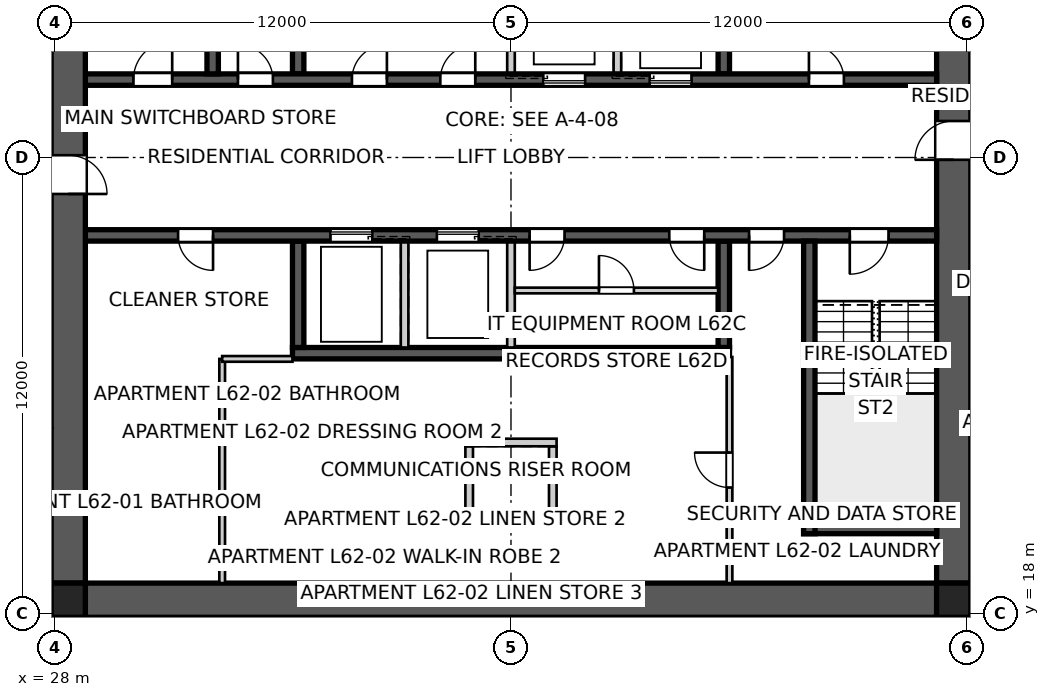
"""IFC4 building model, lengths in metres.
Left out: names, types, materials, properties, quantities, classifications, styles, units other than length and angle.
Written with IfcOpenShell. Run it as: python <this file> out.ifc"""

import sys

from ifc_helpers import new_model, si_unit, direction, frame, frame_2d, origin, origin_2d, place, context, subcontext, project, spatial, polyline, rectangle, outline, extrude, element, fill, save


model = new_model("IFC4")
c1 = context("Model", 3, precision=1e-05, world=origin(), true_north=direction((0.0, 1.0)))
c2 = subcontext(c1, "Body", "Model", "MODEL_VIEW")
j1 = project(units=[si_unit("LENGTHUNIT", "METRE"), si_unit("PLANEANGLEUNIT", "RADIAN")], contexts=[c1])
p1 = place(None, origin())
s1 = spatial("IfcSite", under=j1, at=p1, CompositionType="ELEMENT")
p2 = place(p1, origin())
s2 = spatial("IfcBuilding", under=s1, at=p2, CompositionType="ELEMENT")
p3 = place(p2, frame((0.0, 0.0, 225.2)))
s3 = spatial("IfcBuildingStorey", under=s2, at=p3, CompositionType="ELEMENT", Elevation=225.2)
p4 = place(p3, frame((51.2, 18.35, 0.0), z_axis=(0.0, 0.0, 1.0), x_axis=(-1.0, 0.0, 0.0)))
e1 = element("IfcWall", 1, at=p4, inside=s3, PredefinedType="SHEAR", context=c2, shape_type="SweptSolid", body=[
    extrude(outline(polyline([(0.0, -0.45), (22.4, -0.45), (22.4, -0.025), (22.85, -0.025), (22.85, 0.025), (22.4, 0.025), (22.4, 0.45), (0.0, 0.45), (0.0, 0.025), (-0.45, 0.025), (-0.45, -0.025), (0.0, -0.025), (0.0, -0.45)])), origin(), (0.0, 0.0, 1.0), 3.4),
])
p5 = place(p3, frame((51.65, 18.8, 0.0), z_axis=(0.0, 0.0, 1.0), x_axis=(0.0, 1.0, 0.0)))
e2 = element("IfcWall", 2, at=p5, inside=s3, PredefinedType="SHEAR", context=c2, shape_type="SweptSolid", body=[
    extrude(outline(polyline([(0.0, -0.45), (22.4, -0.45), (22.4, -0.025), (22.85, -0.025), (22.85, 0.025), (22.4, 0.025), (22.4, 0.45), (0.0, 0.45), (0.0, 0.025), (-0.45, 0.025), (-0.45, -0.025), (0.0, -0.025), (0.0, -0.45)])), origin(), (0.0, 0.0, 1.0), 3.4),
])
p6 = place(p5, frame((11.14, 0.0, 0.0)))
e3 = element("IfcOpeningElement", 3, at=p6, cuts=e2, PredefinedType="OPENING", context=c2, shape_type="SweptSolid", body=[
    extrude(rectangle(XDim=1.02, YDim=2.4, at=frame_2d((0.51, 1.2))), frame((0.0, 0.46, 0.0), z_axis=(0.0, -1.0, 0.0), x_axis=(1.0, 0.0, 0.0)), (0.0, 0.0, 1.0), 0.92),
])
p7 = place(p3, frame((28.35, 41.2, 0.0), z_axis=(0.0, 0.0, 1.0), x_axis=(0.0, -1.0, 0.0)))
e4 = element("IfcWall", 4, at=p7, inside=s3, PredefinedType="SHEAR", context=c2, shape_type="SweptSolid", body=[
    extrude(outline(polyline([(0.0, -0.45), (22.4, -0.45), (22.4, -0.025), (22.85, -0.025), (22.85, 0.025), (22.4, 0.025), (22.4, 0.45), (0.0, 0.45), (0.0, 0.025), (-0.45, 0.025), (-0.45, -0.025), (0.0, -0.025), (0.0, -0.45)])), origin(), (0.0, 0.0, 1.0), 3.4),
])
p8 = place(p7, frame((11.14, 0.0, 0.0)))
e5 = element("IfcOpeningElement", 5, at=p8, cuts=e4, PredefinedType="OPENING", context=c2, shape_type="SweptSolid", body=[
    extrude(rectangle(XDim=1.02, YDim=2.4, at=frame_2d((0.51, 1.2))), frame((0.0, 0.46, 0.0), z_axis=(0.0, -1.0, 0.0), x_axis=(1.0, 0.0, 0.0)), (0.0, 0.0, 1.0), 0.92),
])
p9 = place(p3, frame((28.8, 32.05, 0.0), z_axis=(0.0, 0.0, 1.0), x_axis=(1.0, 0.0, 0.0)))
e6 = element("IfcWall", 6, at=p9, inside=s3, PredefinedType="SHEAR", context=c2, shape_type="SweptSolid", body=[
    extrude(rectangle(XDim=22.4, YDim=0.3, at=frame_2d((11.2, 0.0))), origin(), (0.0, 0.0, 1.0), 3.4),
])
p10 = place(p9, frame((19.04, 0.0, 0.0)))
e7 = element("IfcOpeningElement", 7, at=p10, cuts=e6, PredefinedType="OPENING", context=c2, shape_type="SweptSolid", body=[
    extrude(rectangle(XDim=0.92, YDim=2.1, at=frame_2d((0.46, 1.05))), frame((0.0, 0.16, 0.0), z_axis=(0.0, -1.0, 0.0), x_axis=(1.0, 0.0, 0.0)), (0.0, 0.0, 1.0), 0.32),
])
p11 = place(p9, frame((1.265, 0.0, 0.0)))
e8 = element("IfcOpeningElement", 8, at=p11, cuts=e6, PredefinedType="OPENING", context=c2, shape_type="SweptSolid", body=[
    extrude(rectangle(XDim=1.02, YDim=2.1, at=frame_2d((0.51, 1.05))), frame((0.0, 0.16, 0.0), z_axis=(0.0, -1.0, 0.0), x_axis=(1.0, 0.0, 0.0)), (0.0, 0.0, 1.0), 0.32),
])
p12 = place(p9, frame((4.015, 0.0, 0.0)))
e9 = element("IfcOpeningElement", 9, at=p12, cuts=e6, PredefinedType="OPENING", context=c2, shape_type="SweptSolid", body=[
    extrude(rectangle(XDim=0.92, YDim=2.1, at=frame_2d((0.46, 1.05))), frame((0.0, 0.16, 0.0), z_axis=(0.0, -1.0, 0.0), x_axis=(1.0, 0.0, 0.0)), (0.0, 0.0, 1.0), 0.32),
])
p13 = place(p9, frame((7.015, 0.0, 0.0)))
e10 = element("IfcOpeningElement", 10, at=p13, cuts=e6, PredefinedType="OPENING", context=c2, shape_type="SweptSolid", body=[
    extrude(rectangle(XDim=0.92, YDim=2.1, at=frame_2d((0.46, 1.05))), frame((0.0, 0.16, 0.0), z_axis=(0.0, -1.0, 0.0), x_axis=(1.0, 0.0, 0.0)), (0.0, 0.0, 1.0), 0.32),
])
p14 = place(p9, frame((9.34, 0.0, 0.0)))
e11 = element("IfcOpeningElement", 11, at=p14, cuts=e6, PredefinedType="OPENING", context=c2, shape_type="SweptSolid", body=[
    extrude(rectangle(XDim=0.92, YDim=2.1, at=frame_2d((0.46, 1.05))), frame((0.0, 0.16, 0.0), z_axis=(0.0, -1.0, 0.0), x_axis=(1.0, 0.0, 0.0)), (0.0, 0.0, 1.0), 0.32),
])
p15 = place(p9, frame((12.05, 0.0, 0.0)))
e12 = element("IfcOpeningElement", 12, at=p15, cuts=e6, PredefinedType="OPENING", context=c2, shape_type="SweptSolid", body=[
    extrude(rectangle(XDim=1.1, YDim=2.1, at=frame_2d((0.55, 1.05))), frame((0.0, 0.16, 0.0), z_axis=(0.0, -1.0, 0.0), x_axis=(1.0, 0.0, 0.0)), (0.0, 0.0, 1.0), 0.32),
])
p16 = place(p9, frame((14.85, 0.0, 0.0)))
e13 = element("IfcOpeningElement", 13, at=p16, cuts=e6, PredefinedType="OPENING", context=c2, shape_type="SweptSolid", body=[
    extrude(rectangle(XDim=1.1, YDim=2.1, at=frame_2d((0.55, 1.05))), frame((0.0, 0.16, 0.0), z_axis=(0.0, -1.0, 0.0), x_axis=(1.0, 0.0, 0.0)), (0.0, 0.0, 1.0), 0.32),
])
p17 = place(p3, frame((51.2, 27.95, 0.0), z_axis=(0.0, 0.0, 1.0), x_axis=(-1.0, 0.0, 0.0)))
e14 = element("IfcWall", 14, at=p17, inside=s3, PredefinedType="SHEAR", context=c2, shape_type="SweptSolid", body=[
    extrude(rectangle(XDim=22.4, YDim=0.3, at=frame_2d((11.2, 0.0))), origin(), (0.0, 0.0, 1.0), 3.4),
])
p18 = place(p17, frame((19.04, 0.0, 0.0)))
e15 = element("IfcOpeningElement", 15, at=p18, cuts=e14, PredefinedType="OPENING", context=c2, shape_type="SweptSolid", body=[
    extrude(rectangle(XDim=0.92, YDim=2.1, at=frame_2d((0.46, 1.05))), frame((0.0, 0.16, 0.0), z_axis=(0.0, -1.0, 0.0), x_axis=(1.0, 0.0, 0.0)), (0.0, 0.0, 1.0), 0.32),
])
p19 = place(p17, frame((1.265, 0.0, 0.0)))
e16 = element("IfcOpeningElement", 16, at=p19, cuts=e14, PredefinedType="OPENING", context=c2, shape_type="SweptSolid", body=[
    extrude(rectangle(XDim=1.02, YDim=2.1, at=frame_2d((0.51, 1.05))), frame((0.0, 0.16, 0.0), z_axis=(0.0, -1.0, 0.0), x_axis=(1.0, 0.0, 0.0)), (0.0, 0.0, 1.0), 0.32),
])
p20 = place(p17, frame((4.015, 0.0, 0.0)))
e17 = element("IfcOpeningElement", 17, at=p20, cuts=e14, PredefinedType="OPENING", context=c2, shape_type="SweptSolid", body=[
    extrude(rectangle(XDim=0.92, YDim=2.1, at=frame_2d((0.46, 1.05))), frame((0.0, 0.16, 0.0), z_axis=(0.0, -1.0, 0.0), x_axis=(1.0, 0.0, 0.0)), (0.0, 0.0, 1.0), 0.32),
])
p21 = place(p17, frame((9.79, 0.0, 0.0)))
e18 = element("IfcOpeningElement", 18, at=p21, cuts=e14, PredefinedType="OPENING", context=c2, shape_type="SweptSolid", body=[
    extrude(rectangle(XDim=0.92, YDim=2.1, at=frame_2d((0.46, 1.05))), frame((0.0, 0.16, 0.0), z_axis=(0.0, -1.0, 0.0), x_axis=(1.0, 0.0, 0.0)), (0.0, 0.0, 1.0), 0.32),
])
p22 = place(p17, frame((6.115, 0.0, 0.0)))
e19 = element("IfcOpeningElement", 19, at=p22, cuts=e14, PredefinedType="OPENING", context=c2, shape_type="SweptSolid", body=[
    extrude(rectangle(XDim=0.92, YDim=2.1, at=frame_2d((0.46, 1.05))), frame((0.0, 0.16, 0.0), z_axis=(0.0, -1.0, 0.0), x_axis=(1.0, 0.0, 0.0)), (0.0, 0.0, 1.0), 0.32),
])
p23 = place(p17, frame((12.05, 0.0, 0.0)))
e20 = element("IfcOpeningElement", 20, at=p23, cuts=e14, PredefinedType="OPENING", context=c2, shape_type="SweptSolid", body=[
    extrude(rectangle(XDim=1.1, YDim=2.1, at=frame_2d((0.55, 1.05))), frame((0.0, 0.16, 0.0), z_axis=(0.0, -1.0, 0.0), x_axis=(1.0, 0.0, 0.0)), (0.0, 0.0, 1.0), 0.32),
])
p24 = place(p17, frame((14.85, 0.0, 0.0)))
e21 = element("IfcOpeningElement", 21, at=p24, cuts=e14, PredefinedType="OPENING", context=c2, shape_type="SweptSolid", body=[
    extrude(rectangle(XDim=1.1, YDim=2.1, at=frame_2d((0.55, 1.05))), frame((0.0, 0.16, 0.0), z_axis=(0.0, -1.0, 0.0), x_axis=(1.0, 0.0, 0.0)), (0.0, 0.0, 1.0), 0.32),
])
p25 = place(p3, frame((45.75, 24.85, 0.0), z_axis=(0.0, 0.0, 1.0), x_axis=(-1.0, 0.0, 0.0)))
e22 = element("IfcWall", 22, at=p25, inside=s3, PredefinedType="SHEAR", context=c2, shape_type="SweptSolid", body=[
    extrude(rectangle(XDim=11.5, YDim=0.3, at=frame_2d((5.75, 0.0))), origin(), (0.0, 0.0, 1.0), 3.4),
])
for number, where, z_axis, x_axis in (
    (23, (34.4, 32.2, 0.0), (0.0, 0.0, 1.0), (0.0, 1.0, 0.0)),
    (24, (45.6, 27.8, 0.0), (0.0, 0.0, 1.0), (0.0, -1.0, 0.0)),
):
    element("IfcWall", number, at=place(p3, frame(where, z_axis=z_axis, x_axis=x_axis)), inside=s3, PredefinedType="SHEAR", context=c2, shape_type="SweptSolid", body=[
        extrude(rectangle(XDim=2.8, YDim=0.3, at=frame_2d((1.4, 0.0))), origin(), (0.0, 0.0, 1.0), 3.4),
    ])
for number, where, z_axis, x_axis in (
    (25, (40.0, 32.2, 0.0), (0.0, 0.0, 1.0), (0.0, 1.0, 0.0)),
    (26, (40.0, 27.8, 0.0), (0.0, 0.0, 1.0), (0.0, -1.0, 0.0)),
    (27, (42.8, 32.2, 0.0), (0.0, 0.0, 1.0), (0.0, 1.0, 0.0)),
    (28, (37.2, 27.8, 0.0), (0.0, 0.0, 1.0), (0.0, -1.0, 0.0)),
):
    element("IfcWall", number, at=place(p3, frame(where, z_axis=z_axis, x_axis=x_axis)), inside=s3, PredefinedType="SOLIDWALL", context=c2, shape_type="SweptSolid", body=[
        extrude(rectangle(XDim=2.8, YDim=0.2, at=frame_2d((1.4, 0.0))), origin(), (0.0, 0.0, 1.0), 3.4),
    ])
for number, where, z_axis, x_axis in (
    (29, (45.6, 32.2, 0.0), (0.0, 0.0, 1.0), (0.0, 1.0, 0.0)),
    (30, (34.4, 27.8, 0.0), (0.0, 0.0, 1.0), (0.0, -1.0, 0.0)),
):
    element("IfcWall", number, at=place(p3, frame(where, z_axis=z_axis, x_axis=x_axis)), inside=s3, PredefinedType="SHEAR", context=c2, shape_type="SweptSolid", body=[
        extrude(rectangle(XDim=2.8, YDim=0.3, at=frame_2d((1.4, 0.0))), origin(), (0.0, 0.0, 1.0), 3.4),
    ])
for number, where, z_axis, x_axis in (
    (31, (32.15, 32.2, 0.0), (0.0, 0.0, 1.0), (0.0, 1.0, 0.0)),
    (32, (47.85, 27.8, 0.0), (0.0, 0.0, 1.0), (0.0, -1.0, 0.0)),
):
    element("IfcWall", number, at=place(p3, frame(where, z_axis=z_axis, x_axis=x_axis)), inside=s3, PredefinedType="SHEAR", context=c2, shape_type="SweptSolid", body=[
        extrude(rectangle(XDim=7.7, YDim=0.3, at=frame_2d((3.85, 0.0))), origin(), (0.0, 0.0, 1.0), 3.4),
    ])
p26 = place(p3, frame((51.2, 20.25, 0.0), z_axis=(0.0, 0.0, 1.0), x_axis=(-1.0, 0.0, 0.0)))
e33 = element("IfcWall", 33, at=p26, inside=s3, PredefinedType="SHEAR", context=c2, shape_type="SweptSolid", body=[
    extrude(rectangle(XDim=3.5, YDim=0.3, at=frame_2d((1.75, 0.0))), origin(), (0.0, 0.0, 1.0), 3.4),
])
for number, where, z_axis, x_axis in (
    (34, (38.9, 22.4, 0.0), (0.0, 0.0, 1.0), (0.0, -1.0, 0.0)),
    (35, (41.1, 22.4, 0.0), (0.0, 0.0, 1.0), (0.0, -1.0, 0.0)),
):
    element("IfcWall", number, at=place(p3, frame(where, z_axis=z_axis, x_axis=x_axis)), inside=s3, PredefinedType="SOLIDWALL", context=c2, shape_type="SweptSolid", body=[
        extrude(rectangle(XDim=2.0, YDim=0.2, at=frame_2d((1.0, 0.0))), origin(), (0.0, 0.0, 1.0), 3.4),
    ])
for number, where, z_axis, x_axis in (
    (36, (38.8, 22.5, 0.0), (0.0, 0.0, 1.0), (1.0, 0.0, 0.0)),
    (37, (38.8, 20.3, 0.0), (0.0, 0.0, 1.0), (1.0, 0.0, 0.0)),
):
    element("IfcWall", number, at=place(p3, frame(where, z_axis=z_axis, x_axis=x_axis)), inside=s3, PredefinedType="SOLIDWALL", context=c2, shape_type="SweptSolid", body=[
        extrude(rectangle(XDim=2.4, YDim=0.2, at=frame_2d((1.2, 0.0))), origin(), (0.0, 0.0, 1.0), 3.4),
    ])
for number, where, z_axis, x_axis in (
    (38, (28.35, 18.35, 0.0), (0.0, 0.0, 1.0), (1.0, 0.0, 0.0)),
    (39, (51.65, 18.35, 0.0), (0.0, 0.0, 1.0), (1.0, 0.0, 0.0)),
):
    element("IfcColumn", number, at=place(p3, frame(where, z_axis=z_axis, x_axis=x_axis)), inside=s3, PredefinedType="COLUMN", context=c2, shape_type="SweptSolid", body=[
        extrude(rectangle(XDim=0.9, YDim=0.9, at=origin_2d()), origin(), (0.0, 0.0, 1.0), 3.4),
    ])
p27 = place(p3, frame((20.514, 18.75, 0.0), z_axis=(0.0, 0.0, 1.0), x_axis=(0.866020489494, 0.500008511703, 0.0)))
e40 = element("IfcWall", 40, at=p27, inside=s3, PredefinedType="PARTITIONING", context=c2, shape_type="SweptSolid", body=[
    extrude(rectangle(XDim=8.496, YDim=0.25, at=frame_2d((4.248, 0.0))), origin(), (0.0, 0.0, 1.0), 3.25),
])
p28 = place(p3, frame((45.75, 18.8, 0.0), z_axis=(0.0, 0.0, 1.0), x_axis=(0.0, 1.0, 0.0)))
e41 = element("IfcWall", 41, at=p28, inside=s3, PredefinedType="SOLIDWALL", context=c2, shape_type="SweptSolid", body=[
    extrude(rectangle(XDim=5.95, YDim=0.15, at=frame_2d((2.975, 0.0))), origin(), (0.0, 0.0, 1.0), 3.25),
])
p29 = place(p28, frame((2.515, 0.0, 0.0)))
e42 = element("IfcOpeningElement", 42, at=p29, cuts=e41, PredefinedType="OPENING", context=c2, shape_type="SweptSolid", body=[
    extrude(rectangle(XDim=0.92, YDim=2.1, at=frame_2d((0.46, 1.05))), frame((0.0, 0.085, 0.0), z_axis=(0.0, -1.0, 0.0), x_axis=(1.0, 0.0, 0.0)), (0.0, 0.0, 1.0), 0.17),
])
p30 = place(p3, frame((32.4, 18.8, 0.0), z_axis=(0.0, 0.0, 1.0), x_axis=(0.0, 1.0, 0.0)))
e43 = element("IfcWall", 43, at=p30, inside=s3, PredefinedType="SOLIDWALL", context=c2, shape_type="SweptSolid", body=[
    extrude(rectangle(XDim=5.9, YDim=0.15, at=frame_2d((2.95, 0.0))), origin(), (0.0, 0.0, 1.0), 3.25),
])
p31 = place(p3, frame((32.4, 24.7, 0.0), z_axis=(0.0, 0.0, 1.0), x_axis=(1.0, 0.0, 0.0)))
e44 = element("IfcWall", 44, at=p31, inside=s3, PredefinedType="SOLIDWALL", context=c2, shape_type="SweptSolid", body=[
    extrude(rectangle(XDim=1.85, YDim=0.15, at=frame_2d((0.925, 0.0))), origin(), (0.0, 0.0, 1.0), 3.25),
])
p32 = place(p3, frame((52.1, 17.956, 0.0), z_axis=(0.0, 0.0, 1.0), x_axis=(0.0, 1.0, 0.0)))
e45 = element("IfcWall", 45, at=p32, inside=s3, PredefinedType="PARTITIONING", context=c2, shape_type="SweptSolid", body=[
    extrude(rectangle(XDim=0.864, YDim=0.12, at=frame_2d((0.432, 0.0))), origin(), (0.0, 0.0, 1.0), 3.25),
])
p33 = place(p3, frame((51.757, 17.9, 0.0), z_axis=(0.0, 0.0, 1.0), x_axis=(0.986864404584, 0.161550756622, 0.0)))
e46 = element("IfcWall", 46, at=p33, inside=s3, PredefinedType="SOLIDWALL", context=c2, shape_type="SweptSolid", body=[
    extrude(rectangle(XDim=0.348, YDim=0.15, at=frame_2d((0.174, 0.0))), origin(), (0.0, 0.0, 1.0), 3.25),
])
p34 = place(p3, frame((40.1, 26.5, 0.0), z_axis=(0.0, 0.0, 1.0), x_axis=(1.0, 0.0, 0.0)))
e47 = element("IfcWall", 47, at=p34, inside=s3, PredefinedType="SOLIDWALL", context=c2, shape_type="SweptSolid", body=[
    extrude(rectangle(XDim=5.35, YDim=0.15, at=frame_2d((2.675, 0.0))), origin(), (0.0, 0.0, 1.0), 3.25),
])
p35 = place(p34, frame((2.215, 0.0, 0.0)))
e48 = element("IfcOpeningElement", 48, at=p35, cuts=e47, PredefinedType="OPENING", context=c2, shape_type="SweptSolid", body=[
    extrude(rectangle(XDim=0.92, YDim=2.1, at=frame_2d((0.46, 1.05))), frame((0.0, 0.085, 0.0), z_axis=(0.0, -1.0, 0.0), x_axis=(1.0, 0.0, 0.0)), (0.0, 0.0, 1.0), 0.17),
])
p36 = place(p10, origin())
e49 = element("IfcDoor", 49, at=p36, inside=s3, OperationType="SINGLE_SWING_LEFT", PredefinedType="DOOR", context=c2, shape_type="SweptSolid", body=[
    extrude(rectangle(XDim=0.92, YDim=2.1, at=frame_2d((0.46, 1.05))), frame((0.0, 0.025, 0.0), z_axis=(0.0, -1.0, 0.0), x_axis=(1.0, 0.0, 0.0)), (0.0, 0.0, 1.0), 0.05),
])
fill(e7, e49)
p37 = place(p18, origin())
e50 = element("IfcDoor", 50, at=p37, inside=s3, OperationType="SINGLE_SWING_LEFT", PredefinedType="DOOR", context=c2, shape_type="SweptSolid", body=[
    extrude(rectangle(XDim=0.92, YDim=2.1, at=frame_2d((0.46, 1.05))), frame((0.0, 0.025, 0.0), z_axis=(0.0, -1.0, 0.0), x_axis=(1.0, 0.0, 0.0)), (0.0, 0.0, 1.0), 0.05),
])
fill(e15, e50)
p38 = place(p19, origin())
e51 = element("IfcDoor", 51, at=p38, inside=s3, OperationType="SINGLE_SWING_RIGHT", PredefinedType="DOOR", context=c2, shape_type="SweptSolid", body=[
    extrude(rectangle(XDim=1.02, YDim=2.1, at=frame_2d((0.51, 1.05))), frame((0.0, 0.025, 0.0), z_axis=(0.0, -1.0, 0.0), x_axis=(1.0, 0.0, 0.0)), (0.0, 0.0, 1.0), 0.05),
])
fill(e16, e51)
p39 = place(p11, origin())
e52 = element("IfcDoor", 52, at=p39, inside=s3, OperationType="SINGLE_SWING_RIGHT", PredefinedType="DOOR", context=c2, shape_type="SweptSolid", body=[
    extrude(rectangle(XDim=1.02, YDim=2.1, at=frame_2d((0.51, 1.05))), frame((0.0, 0.025, 0.0), z_axis=(0.0, -1.0, 0.0), x_axis=(1.0, 0.0, 0.0)), (0.0, 0.0, 1.0), 0.05),
])
fill(e8, e52)
p40 = place(p12, origin())
e53 = element("IfcDoor", 53, at=p40, inside=s3, OperationType="SINGLE_SWING_LEFT", PredefinedType="DOOR", context=c2, shape_type="SweptSolid", body=[
    extrude(rectangle(XDim=0.92, YDim=2.1, at=frame_2d((0.46, 1.05))), frame((0.0, 0.025, 0.0), z_axis=(0.0, -1.0, 0.0), x_axis=(1.0, 0.0, 0.0)), (0.0, 0.0, 1.0), 0.05),
])
fill(e9, e53)
p41 = place(p20, origin())
e54 = element("IfcDoor", 54, at=p41, inside=s3, OperationType="SINGLE_SWING_RIGHT", PredefinedType="DOOR", context=c2, shape_type="SweptSolid", body=[
    extrude(rectangle(XDim=0.92, YDim=2.1, at=frame_2d((0.46, 1.05))), frame((0.0, 0.025, 0.0), z_axis=(0.0, -1.0, 0.0), x_axis=(1.0, 0.0, 0.0)), (0.0, 0.0, 1.0), 0.05),
])
fill(e17, e54)
p42 = place(p29, origin())
e55 = element("IfcDoor", 55, at=p42, inside=s3, OperationType="SINGLE_SWING_RIGHT", PredefinedType="DOOR", context=c2, shape_type="SweptSolid", body=[
    extrude(rectangle(XDim=0.92, YDim=2.1, at=frame_2d((0.46, 1.05))), frame((0.0, 0.025, 0.0), z_axis=(0.0, -1.0, 0.0), x_axis=(1.0, 0.0, 0.0)), (0.0, 0.0, 1.0), 0.05),
])
fill(e42, e55)
p43 = place(p13, origin())
e56 = element("IfcDoor", 56, at=p43, inside=s3, OperationType="SINGLE_SWING_RIGHT", PredefinedType="DOOR", context=c2, shape_type="SweptSolid", body=[
    extrude(rectangle(XDim=0.92, YDim=2.1, at=frame_2d((0.46, 1.05))), frame((0.0, 0.025, 0.0), z_axis=(0.0, -1.0, 0.0), x_axis=(1.0, 0.0, 0.0)), (0.0, 0.0, 1.0), 0.05),
])
fill(e10, e56)
p44 = place(p14, origin())
e57 = element("IfcDoor", 57, at=p44, inside=s3, OperationType="SINGLE_SWING_RIGHT", PredefinedType="DOOR", context=c2, shape_type="SweptSolid", body=[
    extrude(rectangle(XDim=0.92, YDim=2.1, at=frame_2d((0.46, 1.05))), frame((0.0, 0.025, 0.0), z_axis=(0.0, -1.0, 0.0), x_axis=(1.0, 0.0, 0.0)), (0.0, 0.0, 1.0), 0.05),
])
fill(e11, e57)
p45 = place(p21, origin())
e58 = element("IfcDoor", 58, at=p45, inside=s3, OperationType="SINGLE_SWING_RIGHT", PredefinedType="DOOR", context=c2, shape_type="SweptSolid", body=[
    extrude(rectangle(XDim=0.92, YDim=2.1, at=frame_2d((0.46, 1.05))), frame((0.0, 0.025, 0.0), z_axis=(0.0, -1.0, 0.0), x_axis=(1.0, 0.0, 0.0)), (0.0, 0.0, 1.0), 0.05),
])
fill(e18, e58)
p46 = place(p22, origin())
e59 = element("IfcDoor", 59, at=p46, inside=s3, OperationType="SINGLE_SWING_LEFT", PredefinedType="DOOR", context=c2, shape_type="SweptSolid", body=[
    extrude(rectangle(XDim=0.92, YDim=2.1, at=frame_2d((0.46, 1.05))), frame((0.0, 0.025, 0.0), z_axis=(0.0, -1.0, 0.0), x_axis=(1.0, 0.0, 0.0)), (0.0, 0.0, 1.0), 0.05),
])
fill(e19, e59)
p47 = place(p35, origin())
e60 = element("IfcDoor", 60, at=p47, inside=s3, OperationType="SINGLE_SWING_LEFT", PredefinedType="DOOR", context=c2, shape_type="SweptSolid", body=[
    extrude(rectangle(XDim=0.92, YDim=2.1, at=frame_2d((0.46, 1.05))), frame((0.0, 0.025, 0.0), z_axis=(0.0, -1.0, 0.0), x_axis=(1.0, 0.0, 0.0)), (0.0, 0.0, 1.0), 0.05),
])
fill(e48, e60)
p48 = place(p6, origin())
e61 = element("IfcDoor", 61, at=p48, inside=s3, OperationType="SINGLE_SWING_LEFT", PredefinedType="DOOR", context=c2, shape_type="SweptSolid", body=[
    extrude(rectangle(XDim=1.02, YDim=2.4, at=frame_2d((0.51, 1.2))), frame((0.0, 0.025, 0.0), z_axis=(0.0, -1.0, 0.0), x_axis=(1.0, 0.0, 0.0)), (0.0, 0.0, 1.0), 0.05),
])
fill(e3, e61)
p49 = place(p8, origin())
e62 = element("IfcDoor", 62, at=p49, inside=s3, OperationType="SINGLE_SWING_RIGHT", PredefinedType="DOOR", context=c2, shape_type="SweptSolid", body=[
    extrude(rectangle(XDim=1.02, YDim=2.4, at=frame_2d((0.51, 1.2))), frame((0.0, 0.025, 0.0), z_axis=(0.0, -1.0, 0.0), x_axis=(1.0, 0.0, 0.0)), (0.0, 0.0, 1.0), 0.05),
])
fill(e5, e62)
p50 = place(p15, origin())
e63 = element("IfcDoor", 63, at=p50, inside=s3, OperationType="SLIDING_TO_LEFT", PredefinedType="DOOR", context=c2, shape_type="SweptSolid", body=[
    extrude(rectangle(XDim=1.1, YDim=2.1, at=frame_2d((0.55, 1.05))), frame((0.0, 0.025, 0.0), z_axis=(0.0, -1.0, 0.0), x_axis=(1.0, 0.0, 0.0)), (0.0, 0.0, 1.0), 0.05),
])
fill(e12, e63)
p51 = place(p23, origin())
e64 = element("IfcDoor", 64, at=p51, inside=s3, OperationType="SLIDING_TO_LEFT", PredefinedType="DOOR", context=c2, shape_type="SweptSolid", body=[
    extrude(rectangle(XDim=1.1, YDim=2.1, at=frame_2d((0.55, 1.05))), frame((0.0, 0.025, 0.0), z_axis=(0.0, -1.0, 0.0), x_axis=(1.0, 0.0, 0.0)), (0.0, 0.0, 1.0), 0.05),
])
fill(e20, e64)
p52 = place(p16, origin())
e65 = element("IfcDoor", 65, at=p52, inside=s3, OperationType="SLIDING_TO_LEFT", PredefinedType="DOOR", context=c2, shape_type="SweptSolid", body=[
    extrude(rectangle(XDim=1.1, YDim=2.1, at=frame_2d((0.55, 1.05))), frame((0.0, 0.025, 0.0), z_axis=(0.0, -1.0, 0.0), x_axis=(1.0, 0.0, 0.0)), (0.0, 0.0, 1.0), 0.05),
])
fill(e13, e65)
p53 = place(p24, origin())
e66 = element("IfcDoor", 66, at=p53, inside=s3, OperationType="SLIDING_TO_LEFT", PredefinedType="DOOR", context=c2, shape_type="SweptSolid", body=[
    extrude(rectangle(XDim=1.1, YDim=2.1, at=frame_2d((0.55, 1.05))), frame((0.0, 0.025, 0.0), z_axis=(0.0, -1.0, 0.0), x_axis=(1.0, 0.0, 0.0)), (0.0, 0.0, 1.0), 0.05),
])
fill(e21, e66)
save(model, sys.argv[1])
